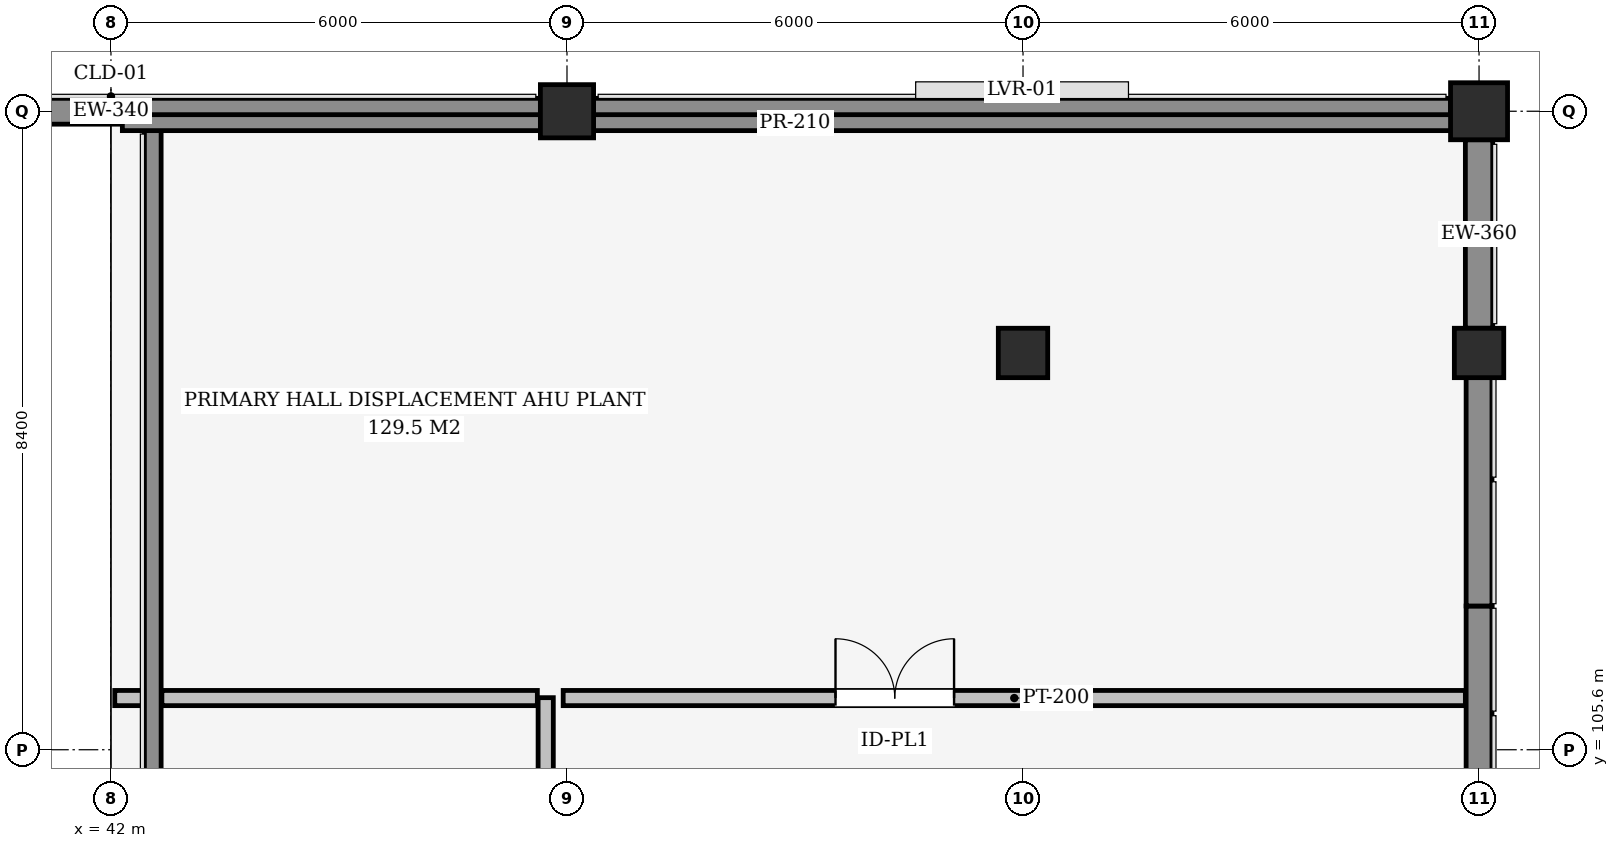
"""IFC4 building model, lengths in metres.
Left out: names, types, materials, properties, quantities, classifications, styles, units other than length and angle.
Written with IfcOpenShell. Run it as: python <this file> out.ifc"""

import sys

from ifc_helpers import new_model, si_unit, direction, frame, frame_2d, origin, origin_2d, place, context, subcontext, project, spatial, polyline, rectangle, outline, extrude, element, fill, save


model = new_model("IFC4")
c1 = context("Model", 3, precision=1e-05, world=origin(), true_north=direction((0.0, 1.0)))
c2 = subcontext(c1, "Body", "Model", "MODEL_VIEW")
j1 = project(units=[si_unit("LENGTHUNIT", "METRE"), si_unit("PLANEANGLEUNIT", "RADIAN")], contexts=[c1])
p1 = place(None, origin())
s1 = spatial("IfcSite", under=j1, at=p1, CompositionType="ELEMENT")
p2 = place(p1, origin())
s2 = spatial("IfcBuilding", under=s1, at=p2, CompositionType="ELEMENT")
p3 = place(p2, frame((0.0, 0.0, 22.2)))
s3 = spatial("IfcBuildingStorey", under=s2, at=p3, CompositionType="ELEMENT", Elevation=22.2)
p4 = place(p3, frame((48.0, 114.0, 0.0), z_axis=(0.0, 0.0, 1.0), x_axis=(1.0, 0.0, 0.0)))
e1 = element("IfcColumn", 1, at=p4, inside=s3, PredefinedType="COLUMN", context=c2, shape_type="SweptSolid", body=[
    extrude(rectangle(XDim=0.7, YDim=0.7, at=origin_2d()), origin(), (0.0, 0.0, 1.0), 4.37),
])
p5 = place(p3, frame((60.0, 114.0, 0.0), z_axis=(0.0, 0.0, 1.0), x_axis=(1.0, 0.0, 0.0)))
e2 = element("IfcColumn", 2, at=p5, inside=s3, PredefinedType="COLUMN", context=c2, shape_type="SweptSolid", body=[
    extrude(rectangle(XDim=0.75, YDim=0.75, at=origin_2d()), origin(), (0.0, 0.0, 1.0), 4.37),
])
for number, where, z_axis, x_axis in (
    (3, (54.0, 110.82, 0.0), (0.0, 0.0, 1.0), (1.0, 0.0, 0.0)),
    (4, (60.0, 110.82, 0.0), (0.0, 0.0, 1.0), (1.0, 0.0, 0.0)),
):
    element("IfcColumn", number, at=place(p3, frame(where, z_axis=z_axis, x_axis=x_axis)), inside=s3, PredefinedType="COLUMN", context=c2, shape_type="SweptSolid", body=[
        extrude(rectangle(XDim=0.65, YDim=0.65, at=origin_2d()), origin(), (0.0, 0.0, 1.0), 4.37),
    ])
p6 = place(p3, frame((36.35, 114.0, 0.0), z_axis=(0.0, 0.0, 1.0), x_axis=(1.0, 0.0, 0.0)))
e5 = element("IfcWall", 5, at=p6, inside=s3, PredefinedType="SOLIDWALL", context=c2, shape_type="SweptSolid", body=[
    extrude(rectangle(XDim=11.3, YDim=0.34, at=frame_2d((5.65, 0.0))), origin(), (0.0, 0.0, 1.0), 4.5),
])
p7 = place(p3, frame((48.35, 114.0, 0.0), z_axis=(0.0, 0.0, 1.0), x_axis=(1.0, 0.0, 0.0)))
e6 = element("IfcWall", 6, at=p7, inside=s3, PredefinedType="SOLIDWALL", context=c2, shape_type="SweptSolid", body=[
    extrude(rectangle(XDim=11.275, YDim=0.34, at=frame_2d((5.637, 0.0))), origin(), (0.0, 0.0, 1.0), 3.977),
])
p8 = place(p3, frame((60.0, 113.625, 0.0), z_axis=(0.0, 0.0, 1.0), x_axis=(0.0, -1.0, 0.0)))
e7 = element("IfcWall", 7, at=p8, inside=s3, PredefinedType="SOLIDWALL", context=c2, shape_type="SweptSolid", body=[
    extrude(rectangle(XDim=2.48, YDim=0.36, at=frame_2d((1.24, 0.0))), origin(), (0.0, 0.0, 1.0), 3.738),
])
p9 = place(p3, frame((42.55, 68.64, 0.0), z_axis=(0.0, 0.0, 1.0), x_axis=(0.0, 1.0, 0.0)))
e8 = element("IfcWall", 8, at=p9, inside=s3, PredefinedType="SOLIDWALL", context=c2, shape_type="SweptSolid", body=[
    extrude(rectangle(XDim=45.12, YDim=0.22, at=frame_2d((22.56, 0.0))), origin(), (0.0, 0.0, 1.0), 3.15),
])
p10 = place(p3, frame((60.0, 107.491, 0.0), z_axis=(0.0, 0.0, 1.0), x_axis=(0.0, -1.0, 0.0)))
e9 = element("IfcWall", 9, at=p10, inside=s3, PredefinedType="SOLIDWALL", context=c2, shape_type="SweptSolid", body=[
    extrude(outline(polyline([(0.0, 0.0), (4.24, 0.0), (4.24, 8.163), (0.0, 4.463), (0.0, 0.0)])), frame((0.0, 0.17, 0.0), z_axis=(0.0, -1.0, 0.0), x_axis=(1.0, 0.0, 0.0)), (0.0, 0.0, 1.0), 0.34),
])
p11 = place(p3, frame((60.0, 110.82, 0.0), z_axis=(0.0, 0.0, 1.0), x_axis=(0.0, -1.0, 0.0)))
e10 = element("IfcWall", 10, at=p11, inside=s3, PredefinedType="SOLIDWALL", context=c2, shape_type="SweptSolid", body=[
    extrude(outline(polyline([(0.0, 0.0), (3.329, 0.0), (3.329, 4.463), (0.0, 0.25), (0.0, 0.0)])), frame((0.0, 0.17, 0.0), z_axis=(0.0, -1.0, 0.0), x_axis=(1.0, 0.0, 0.0)), (0.0, 0.0, 1.0), 0.34),
])
p12 = place(p3, frame((42.15, 113.85, 4.56), z_axis=(0.0, 0.0, 1.0), x_axis=(1.0, 0.0, 0.0)))
e11 = element("IfcWall", 11, at=p12, inside=s3, PredefinedType="PARAPET", context=c2, shape_type="SweptSolid", body=[
    extrude(rectangle(XDim=17.7, YDim=0.21, at=frame_2d((8.85, 0.0))), origin(), (0.0, 0.0, 1.0), 0.94),
])
p13 = place(p3, frame((47.72, 97.533, 0.0), z_axis=(0.0, 0.0, 1.0), x_axis=(0.0, 1.0, 0.0)))
e12 = element("IfcWall", 12, at=p13, inside=s3, PredefinedType="PARTITIONING", context=c2, shape_type="SweptSolid", body=[
    extrude(rectangle(XDim=8.752, YDim=0.2, at=frame_2d((4.376, 0.0))), origin(), (0.0, 0.0, 1.0), 4.5),
])
p14 = place(p3, frame((47.95, 106.28, 0.0), z_axis=(0.0, 0.0, 1.0), x_axis=(1.0, 0.0, 0.0)))
e13 = element("IfcWall", 13, at=p14, inside=s3, PredefinedType="PARTITIONING", context=c2, shape_type="SweptSolid", body=[
    extrude(rectangle(XDim=11.87, YDim=0.2, at=frame_2d((5.935, 0.0))), origin(), (0.0, 0.0, 1.0), 4.5),
])
p15 = place(p14, frame((3.583, 0.0, 0.0)))
e14 = element("IfcOpeningElement", 14, at=p15, cuts=e13, PredefinedType="OPENING", context=c2, shape_type="SweptSolid", body=[
    extrude(rectangle(XDim=1.56, YDim=2.26, at=frame_2d((0.78, 1.13))), frame((0.0, 0.11, 0.0), z_axis=(0.0, -1.0, 0.0), x_axis=(1.0, 0.0, 0.0)), (0.0, 0.0, 1.0), 0.22),
])
p16 = place(p3, frame((42.05, 106.28, 0.0), z_axis=(0.0, 0.0, 1.0), x_axis=(1.0, 0.0, 0.0)))
e15 = element("IfcWall", 15, at=p16, inside=s3, PredefinedType="PARTITIONING", context=c2, shape_type="SweptSolid", body=[
    extrude(rectangle(XDim=0.38, YDim=0.2, at=frame_2d((0.19, 0.0))), origin(), (0.0, 0.0, 1.0), 4.5),
])
p17 = place(p3, frame((42.67, 106.28, 0.0), z_axis=(0.0, 0.0, 1.0), x_axis=(1.0, 0.0, 0.0)))
e16 = element("IfcWall", 16, at=p17, inside=s3, PredefinedType="PARTITIONING", context=c2, shape_type="SweptSolid", body=[
    extrude(rectangle(XDim=4.94, YDim=0.2, at=frame_2d((2.47, 0.0))), origin(), (0.0, 0.0, 1.0), 4.5),
])
p18 = place(p15, origin())
e17 = element("IfcDoor", 17, at=p18, inside=s3, OperationType="DOUBLE_DOOR_SINGLE_SWING", PredefinedType="DOOR", context=c2, shape_type="SweptSolid", body=[
    extrude(rectangle(XDim=1.56, YDim=2.26, at=frame_2d((0.78, 1.13))), frame((0.0, 0.025, 0.0), z_axis=(0.0, -1.0, 0.0), x_axis=(1.0, 0.0, 0.0)), (0.0, 0.0, 1.0), 0.05),
])
fill(e14, e17)
save(model, sys.argv[1])
